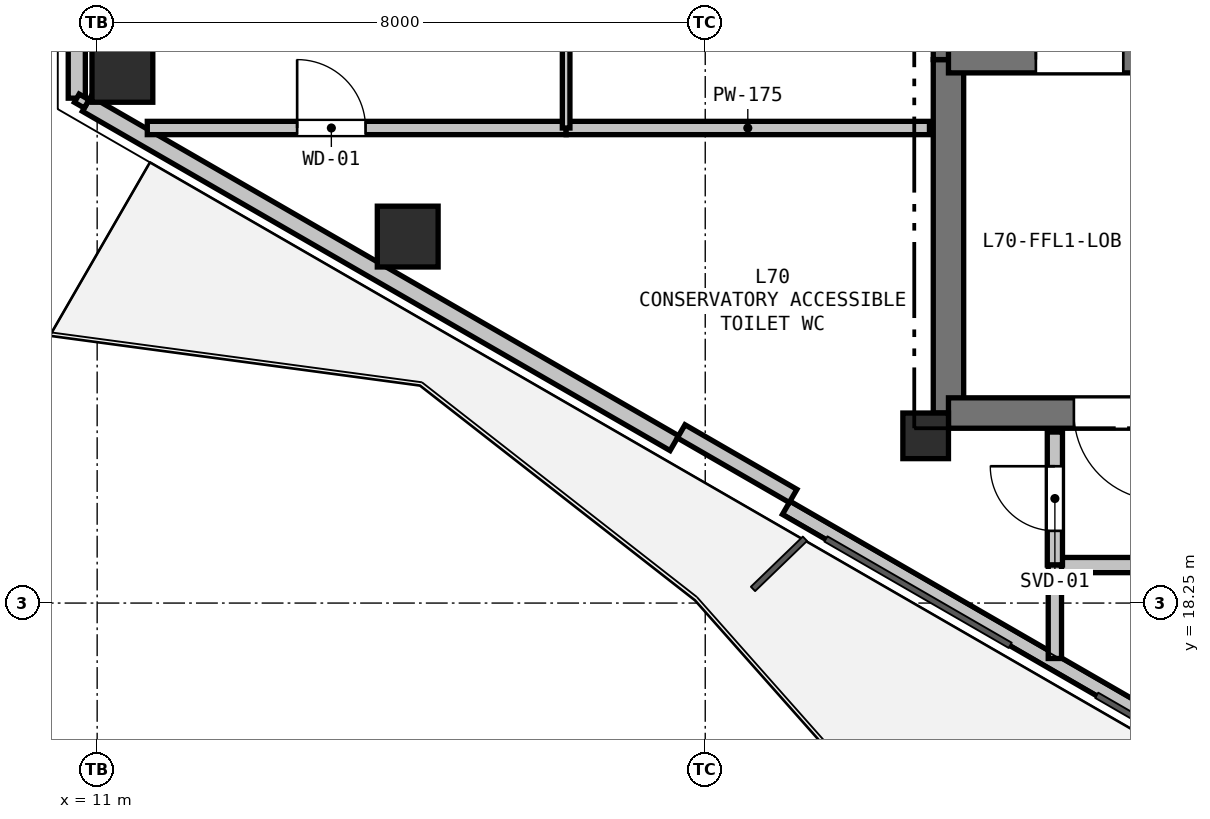
"""IFC4 building model, lengths in metres.
Left out: names, types, materials, properties, quantities, classifications, styles, units other than length and angle.
Written with IfcOpenShell. Run it as: python <this file> out.ifc"""

import sys

from ifc_helpers import new_model, si_unit, direction, frame, frame_2d, origin, origin_2d, place, context, subcontext, project, spatial, rectangle, hollow_rectangle, extrude, element, fill, save


model = new_model("IFC4")
c1 = context("Model", 3, precision=1e-05, world=origin(), true_north=direction((0.0, 1.0)))
c2 = subcontext(c1, "Body", "Model", "MODEL_VIEW")
j1 = project(units=[si_unit("LENGTHUNIT", "METRE"), si_unit("PLANEANGLEUNIT", "RADIAN")], contexts=[c1])
p1 = place(None, origin())
s1 = spatial("IfcSite", under=j1, at=p1, CompositionType="ELEMENT")
p2 = place(p1, origin())
s2 = spatial("IfcBuilding", under=s1, at=p2, CompositionType="ELEMENT")
p3 = place(p2, frame((0.0, 0.0, 249.6)))
s3 = spatial("IfcBuildingStorey", under=s2, at=p3, CompositionType="ELEMENT", Elevation=249.6)
p4 = place(p3, frame((21.9, 20.45, 0.0), z_axis=(0.0, 0.0, 1.0), x_axis=(1.0, 0.0, 0.0)))
e1 = element("IfcColumn", 1, at=p4, inside=s3, PredefinedType="COLUMN", context=c2, shape_type="SweptSolid", body=[
    extrude(rectangle(XDim=0.6, YDim=0.6, at=origin_2d()), origin(), (0.0, 0.0, 1.0), 4.5),
])
for number, where, z_axis, x_axis in (
    (2, (15.086, 23.072, 0.0), (0.0, 0.0, 1.0), (1.0, 0.0, 0.0)),
    (3, (11.332, 25.239, 0.0), (0.0, 0.0, 1.0), (1.0, 0.0, 0.0)),
):
    element("IfcColumn", number, at=place(p3, frame(where, z_axis=z_axis, x_axis=x_axis)), inside=s3, PredefinedType="COLUMN", context=c2, shape_type="SweptSolid", body=[
        extrude(hollow_rectangle(XDim=0.8, YDim=0.8, WallThickness=0.025, at=origin_2d()), origin(), (0.0, 0.0, 1.0), 4.5),
    ])
p5 = place(p3, frame((10.732, 24.892, 0.0), z_axis=(0.0, 0.0, 1.0), x_axis=(0.0, 1.0, 0.0)))
e4 = element("IfcWall", 4, at=p5, inside=s3, PredefinedType="SOLIDWALL", context=c2, shape_type="SweptSolid", body=[
    extrude(rectangle(XDim=3.715, YDim=0.225, at=frame_2d((1.858, 0.0))), origin(), (0.0, 0.0, 1.0), 3.84),
])
p6 = place(p3, frame((27.191, 15.389, 0.0), z_axis=(0.0, 0.0, 1.0), x_axis=(-0.866019557082, 0.500010126649, 0.0)))
e5 = element("IfcWall", 5, at=p6, inside=s3, PredefinedType="PARAPET", context=c2, shape_type="SweptSolid", body=[
    extrude(rectangle(XDim=8.228, YDim=0.2, at=frame_2d((4.114, 0.0))), origin(), (0.0, 0.0, 1.0), 0.2),
])
p7 = place(p3, frame((18.594, 20.354, 0.0), z_axis=(0.0, 0.0, 1.0), x_axis=(-0.866026655105, 0.499997832642, 0.0)))
e6 = element("IfcWall", 6, at=p7, inside=s3, PredefinedType="SOLIDWALL", context=c2, shape_type="SweptSolid", body=[
    extrude(rectangle(XDim=8.928, YDim=0.225, at=frame_2d((4.464, 0.0))), origin(), (0.0, 0.0, 1.0), 3.84),
])
p8 = place(p3, frame((20.156, 19.659, 0.0), z_axis=(0.0, 0.0, 1.0), x_axis=(-0.866025371046, 0.500000056704, 0.0)))
e7 = element("IfcWall", 7, at=p8, inside=s3, PredefinedType="PARAPET", context=c2, shape_type="SweptSolid", body=[
    extrude(rectangle(XDim=1.7, YDim=0.2, at=frame_2d((0.85, 0.0))), origin(), (0.0, 0.0, 1.0), 3.84),
])
p9 = place(p3, frame((22.2, 20.75, 0.0), z_axis=(0.0, 0.0, 1.0), x_axis=(0.0, 1.0, 0.0)))
e8 = element("IfcWall", 8, at=p9, inside=s3, PredefinedType="SHEAR", context=c2, shape_type="SweptSolid", body=[
    extrude(rectangle(XDim=4.65, YDim=0.4, at=frame_2d((2.325, 0.0))), origin(), (0.0, 0.0, 1.0), 4.22),
])
p10 = place(p3, frame((22.2, 25.4, 0.0), z_axis=(0.0, 0.0, 1.0), x_axis=(0.0, 1.0, 0.0)))
e9 = element("IfcWall", 9, at=p10, inside=s3, PredefinedType="SHEAR", context=c2, shape_type="SweptSolid", body=[
    extrude(rectangle(XDim=7.35, YDim=0.4, at=frame_2d((3.675, 0.0))), origin(), (0.0, 0.0, 1.0), 4.22),
])
p11 = place(p3, frame((25.65, 20.75, 0.0), z_axis=(0.0, 0.0, 1.0), x_axis=(-1.0, 0.0, 0.0)))
e10 = element("IfcWall", 10, at=p11, inside=s3, PredefinedType="SHEAR", context=c2, shape_type="SweptSolid", body=[
    extrude(rectangle(XDim=3.45, YDim=0.4, at=frame_2d((1.725, 0.0))), origin(), (0.0, 0.0, 1.0), 4.22),
])
p12 = place(p11, frame((0.65, 0.0, 0.0)))
e11 = element("IfcOpeningElement", 11, at=p12, cuts=e10, PredefinedType="OPENING", context=c2, shape_type="SweptSolid", body=[
    extrude(rectangle(XDim=1.15, YDim=2.15, at=frame_2d((0.575, 1.075))), frame((0.0, 0.21, 0.0), z_axis=(0.0, -1.0, 0.0), x_axis=(1.0, 0.0, 0.0)), (0.0, 0.0, 1.0), 0.42),
])
p13 = place(p3, frame((22.2, 25.4, 0.0), z_axis=(0.0, 0.0, 1.0), x_axis=(1.0, 0.0, 0.0)))
e12 = element("IfcWall", 12, at=p13, inside=s3, PredefinedType="SHEAR", context=c2, shape_type="SweptSolid", body=[
    extrude(rectangle(XDim=3.45, YDim=0.35, at=frame_2d((1.725, 0.0))), origin(), (0.0, 0.0, 1.0), 4.22),
])
p14 = place(p13, frame((1.15, 0.0, 0.0)))
e13 = element("IfcOpeningElement", 13, at=p14, cuts=e12, PredefinedType="OPENING", context=c2, shape_type="SweptSolid", body=[
    extrude(rectangle(XDim=1.15, YDim=2.15, at=frame_2d((0.575, 1.075))), frame((0.0, 0.185, 0.0), z_axis=(0.0, -1.0, 0.0), x_axis=(1.0, 0.0, 0.0)), (0.0, 0.0, 1.0), 0.37),
])
p15 = place(p3, frame((27.2, 18.75, 0.0), z_axis=(0.0, 0.0, 1.0), x_axis=(-1.0, 0.0, 0.0)))
e14 = element("IfcWall", 14, at=p15, inside=s3, PredefinedType="PARTITIONING", context=c2, shape_type="SweptSolid", body=[
    extrude(rectangle(XDim=3.6, YDim=0.2, at=frame_2d((1.8, 0.0))), origin(), (0.0, 0.0, 1.0), 3.668),
])
p16 = place(p15, frame((1.375, 0.0, 0.0)))
e15 = element("IfcOpeningElement", 15, at=p16, cuts=e14, PredefinedType="OPENING", context=c2, shape_type="SweptSolid", body=[
    extrude(rectangle(XDim=0.85, YDim=2.1, at=frame_2d((0.425, 1.05))), frame((0.0, 0.11, 0.0), z_axis=(0.0, -1.0, 0.0), x_axis=(1.0, 0.0, 0.0)), (0.0, 0.0, 1.0), 0.22),
])
p17 = place(p3, frame((23.6, 18.75, 0.0), z_axis=(0.0, 0.0, 1.0), x_axis=(0.0, 1.0, 0.0)))
e16 = element("IfcWall", 16, at=p17, inside=s3, PredefinedType="PARTITIONING", context=c2, shape_type="SweptSolid", body=[
    extrude(rectangle(XDim=1.75, YDim=0.2, at=frame_2d((0.875, 0.0))), origin(), (0.0, 0.0, 1.0), 3.668),
])
p18 = place(p17, frame((0.45, 0.0, 0.0)))
e17 = element("IfcOpeningElement", 17, at=p18, cuts=e16, PredefinedType="OPENING", context=c2, shape_type="SweptSolid", body=[
    extrude(rectangle(XDim=0.85, YDim=2.1, at=frame_2d((0.425, 1.05))), frame((0.0, 0.11, 0.0), z_axis=(0.0, -1.0, 0.0), x_axis=(1.0, 0.0, 0.0)), (0.0, 0.0, 1.0), 0.22),
])
p19 = place(p3, frame((23.6, 17.521, 0.0), z_axis=(0.0, 0.0, 1.0), x_axis=(0.0, 1.0, 0.0)))
e18 = element("IfcWall", 18, at=p19, inside=s3, PredefinedType="PLUMBINGWALL", context=c2, shape_type="SweptSolid", body=[
    extrude(rectangle(XDim=1.229, YDim=0.175, at=frame_2d((0.615, 0.0))), origin(), (0.0, 0.0, 1.0), 2.365),
])
p20 = place(p3, frame((11.66, 24.5, 0.0), z_axis=(0.0, 0.0, 1.0), x_axis=(1.0, 0.0, 0.0)))
e19 = element("IfcWall", 19, at=p20, inside=s3, PredefinedType="PLUMBINGWALL", context=c2, shape_type="SweptSolid", body=[
    extrude(rectangle(XDim=5.51, YDim=0.175, at=frame_2d((2.755, 0.0))), origin(), (0.0, 0.0, 1.0), 3.668),
])
p21 = place(p20, frame((1.971, 0.0, 0.0)))
e20 = element("IfcOpeningElement", 20, at=p21, cuts=e19, PredefinedType="OPENING", context=c2, shape_type="SweptSolid", body=[
    extrude(rectangle(XDim=0.9, YDim=2.1, at=frame_2d((0.45, 1.05))), frame((0.0, 0.097, 0.0), z_axis=(0.0, -1.0, 0.0), x_axis=(1.0, 0.0, 0.0)), (0.0, 0.0, 1.0), 0.195),
])
p22 = place(p3, frame((17.17, 24.5, 0.0), z_axis=(0.0, 0.0, 1.0), x_axis=(1.0, 0.0, 0.0)))
e21 = element("IfcWall", 21, at=p22, inside=s3, PredefinedType="PLUMBINGWALL", context=c2, shape_type="SweptSolid", body=[
    extrude(rectangle(XDim=4.78, YDim=0.175, at=frame_2d((2.39, 0.0))), origin(), (0.0, 0.0, 1.0), 3.745),
])
p23 = place(p3, frame((17.17, 32.167, 0.0), z_axis=(0.0, 0.0, 1.0), x_axis=(0.0, -1.0, 0.0)))
e22 = element("IfcWall", 22, at=p23, inside=s3, PredefinedType="PARTITIONING", context=c2, shape_type="SweptSolid", body=[
    extrude(rectangle(XDim=7.667, YDim=0.1, at=frame_2d((3.833, 0.0))), origin(), (0.0, 0.0, 1.0), 2.365),
])
p24 = place(p3, frame((10.862, 24.817, 0.0), z_axis=(0.0, 0.0, 1.0), x_axis=(-0.866131372301, 0.499816412211, 0.0)))
e23 = element("IfcWall", 23, at=p24, inside=s3, PredefinedType="PARTITIONING", context=c2, shape_type="SweptSolid", body=[
    extrude(rectangle(XDim=0.15, YDim=0.125, at=frame_2d((0.075, 0.0))), origin(), (0.0, 0.0, 1.0), 4.22),
])
p25 = place(p14, origin())
e24 = element("IfcDoor", 24, at=p25, inside=s3, OperationType="SINGLE_SWING_LEFT", PredefinedType="DOOR", context=c2, shape_type="SweptSolid", body=[
    extrude(rectangle(XDim=1.15, YDim=2.15, at=frame_2d((0.575, 1.075))), frame((0.0, 0.025, 0.0), z_axis=(0.0, -1.0, 0.0), x_axis=(1.0, 0.0, 0.0)), (0.0, 0.0, 1.0), 0.05),
])
fill(e13, e24)
p26 = place(p12, origin())
e25 = element("IfcDoor", 25, at=p26, inside=s3, OperationType="SINGLE_SWING_LEFT", PredefinedType="DOOR", context=c2, shape_type="SweptSolid", body=[
    extrude(rectangle(XDim=1.15, YDim=2.15, at=frame_2d((0.575, 1.075))), frame((0.0, 0.025, 0.0), z_axis=(0.0, -1.0, 0.0), x_axis=(1.0, 0.0, 0.0)), (0.0, 0.0, 1.0), 0.05),
])
fill(e11, e25)
p27 = place(p18, origin())
e26 = element("IfcDoor", 26, at=p27, inside=s3, OperationType="SINGLE_SWING_RIGHT", PredefinedType="DOOR", context=c2, shape_type="SweptSolid", body=[
    extrude(rectangle(XDim=0.85, YDim=2.1, at=frame_2d((0.425, 1.05))), frame((0.0, 0.025, 0.0), z_axis=(0.0, -1.0, 0.0), x_axis=(1.0, 0.0, 0.0)), (0.0, 0.0, 1.0), 0.05),
])
fill(e17, e26)
p28 = place(p21, origin())
e27 = element("IfcDoor", 27, at=p28, inside=s3, OperationType="SINGLE_SWING_LEFT", PredefinedType="DOOR", context=c2, shape_type="SweptSolid", body=[
    extrude(rectangle(XDim=0.9, YDim=2.1, at=frame_2d((0.45, 1.05))), frame((0.0, 0.025, 0.0), z_axis=(0.0, -1.0, 0.0), x_axis=(1.0, 0.0, 0.0)), (0.0, 0.0, 1.0), 0.05),
])
fill(e20, e27)
save(model, sys.argv[1])
